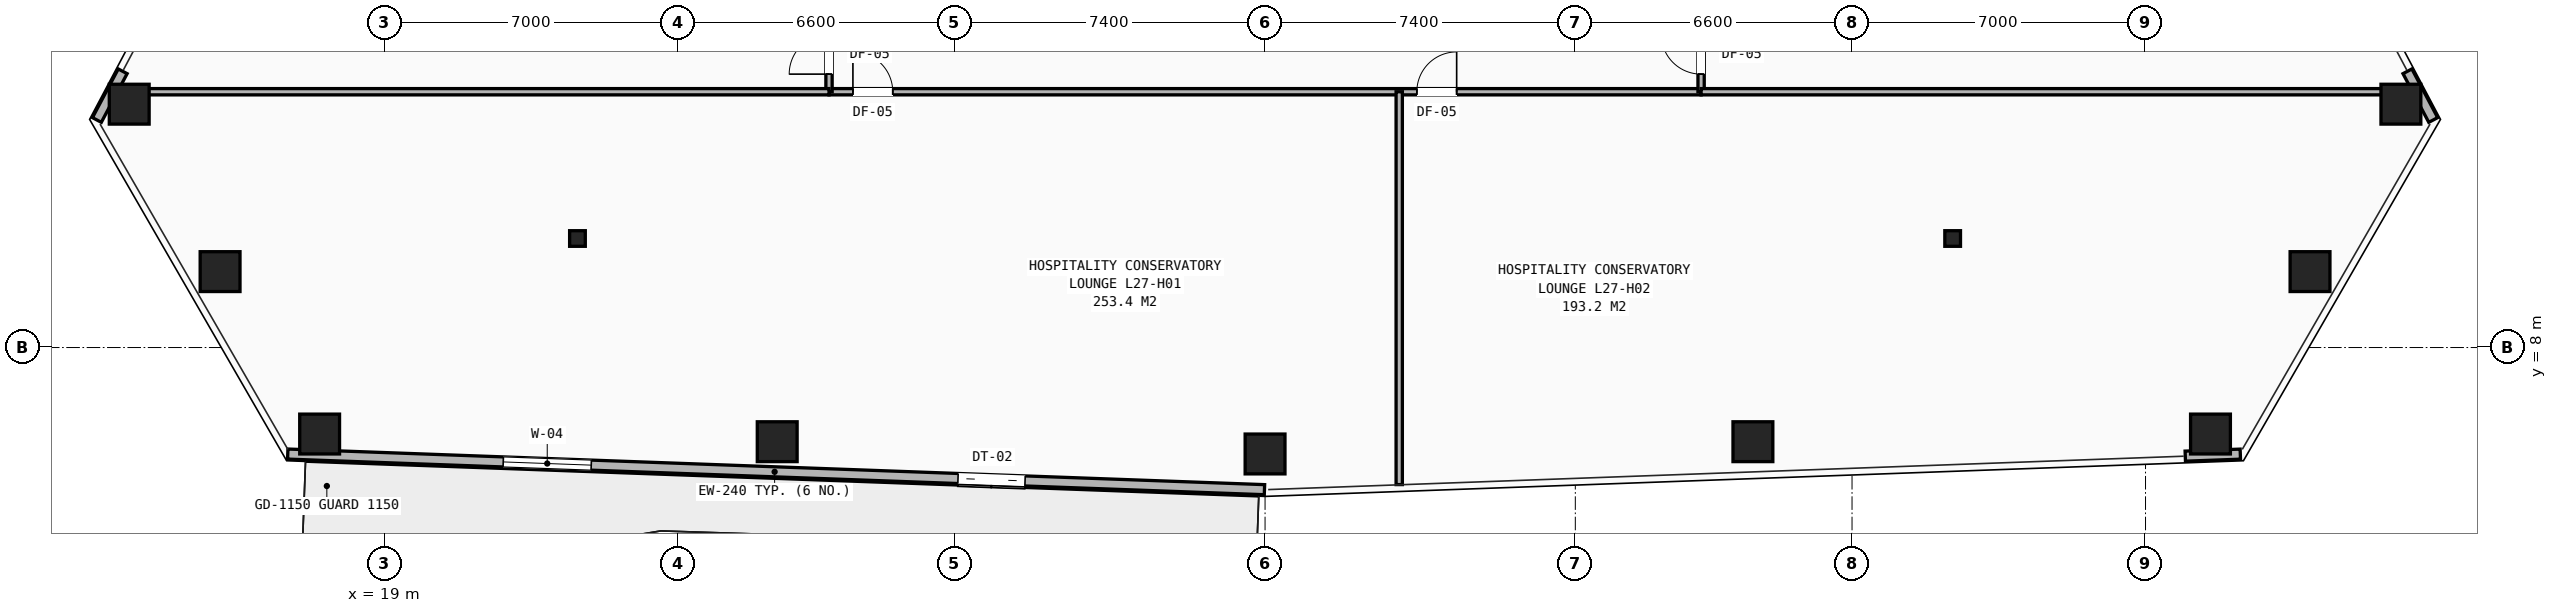
"""IFC4 building model, lengths in metres.
Left out: names, types, materials, properties, quantities, classifications, styles, units other than length and angle.
Written with IfcOpenShell. Run it as: python <this file> out.ifc"""

import sys

from ifc_helpers import new_model, si_unit, direction, frame, frame_2d, origin, origin_2d, place, context, subcontext, project, spatial, rectangle, hollow_rectangle, i_section, extrude, element, fill, save


model = new_model("IFC4")
c1 = context("Model", 3, precision=1e-05, world=origin(), true_north=direction((0.0, 1.0)))
c2 = subcontext(c1, "Body", "Model", "MODEL_VIEW")
j1 = project(units=[si_unit("LENGTHUNIT", "METRE"), si_unit("PLANEANGLEUNIT", "RADIAN")], contexts=[c1])
p1 = place(None, origin())
s1 = spatial("IfcSite", under=j1, at=p1, CompositionType="ELEMENT")
p2 = place(p1, origin())
s2 = spatial("IfcBuilding", under=s1, at=p2, CompositionType="ELEMENT")
p3 = place(p2, frame((0.0, 0.0, 95.8)))
s3 = spatial("IfcBuildingStorey", under=s2, at=p3, CompositionType="ELEMENT", Elevation=95.8)
for number, where, z_axis, x_axis in (
    (1, (23.6, 10.6, 0.0), (0.0, 0.0, 1.0), (1.0, 0.0, 0.0)),
    (2, (56.4, 10.6, 0.0), (0.0, 0.0, 1.0), (1.0, 0.0, 0.0)),
):
    element("IfcColumn", number, at=place(p3, frame(where, z_axis=z_axis, x_axis=x_axis)), inside=s3, PredefinedType="COLUMN", context=c2, shape_type="SweptSolid", body=[
        extrude(i_section(OverallWidth=0.374, OverallDepth=0.372, WebThickness=0.016, FlangeThickness=0.026, at=origin_2d()), origin(), (0.0, 0.0, 1.0), 3.2),
    ])
for number, where, z_axis, x_axis in (
    (3, (12.909, 13.803, 0.0), (0.0, 0.0, 1.0), (1.0, 0.0, 0.0)),
    (4, (15.076, 9.81, 0.0), (0.0, 0.0, 1.0), (1.0, 0.0, 0.0)),
    (5, (17.451, 5.937, 0.0), (0.0, 0.0, 1.0), (1.0, 0.0, 0.0)),
    (6, (28.364, 5.754, 0.0), (0.0, 0.0, 1.0), (1.0, 0.0, 0.0)),
    (7, (40.0, 5.461, 0.0), (0.0, 0.0, 1.0), (1.0, 0.0, 0.0)),
    (8, (51.636, 5.754, 0.0), (0.0, 0.0, 1.0), (1.0, 0.0, 0.0)),
    (9, (62.549, 5.937, 0.0), (0.0, 0.0, 1.0), (1.0, 0.0, 0.0)),
    (10, (64.924, 9.81, 0.0), (0.0, 0.0, 1.0), (1.0, 0.0, 0.0)),
    (11, (67.091, 13.803, 0.0), (0.0, 0.0, 1.0), (1.0, 0.0, 0.0)),
):
    element("IfcColumn", number, at=place(p3, frame(where, z_axis=z_axis, x_axis=x_axis)), inside=s3, PredefinedType="COLUMN", context=c2, shape_type="SweptSolid", body=[
        extrude(hollow_rectangle(XDim=0.95, YDim=0.95, WallThickness=0.065, at=origin_2d()), origin(), (0.0, 0.0, 1.0), 3.2),
    ])
p4 = place(p3, frame((12.753, 14.587, 0.0), z_axis=(0.0, 0.0, 1.0), x_axis=(-0.468058524958, -0.883697469281, 0.0)))
e12 = element("IfcWall", 12, at=p4, inside=s3, PredefinedType="SHEAR", context=c2, shape_type="SweptSolid", body=[
    extrude(rectangle(XDim=1.313, YDim=0.24, at=frame_2d((0.657, 0.0))), origin(), (0.0, 0.0, 1.0), 2.253),
])
p5 = place(p3, frame((39.986, 4.61, 0.0), z_axis=(0.0, 0.0, 1.0), x_axis=(-0.999336382455, 0.036425193232, 0.0)))
e13 = element("IfcWall", 13, at=p5, inside=s3, PredefinedType="SHEAR", context=c2, shape_type="SweptSolid", body=[
    extrude(rectangle(XDim=23.311, YDim=0.24, at=frame_2d((11.656, 0.0))), origin(), (0.0, 0.0, 1.0), 2.253),
])
p6 = place(p5, frame((5.714, 0.0, 0.0)))
e14 = element("IfcOpeningElement", 14, at=p6, cuts=e13, PredefinedType="OPENING", context=c2, shape_type="SweptSolid", body=[
    extrude(rectangle(XDim=1.6, YDim=2.04, at=frame_2d((0.8, 1.02))), frame((0.0, 0.13, 0.0), z_axis=(0.0, -1.0, 0.0), x_axis=(1.0, 0.0, 0.0)), (0.0, 0.0, 1.0), 0.26),
])
p7 = place(p5, frame((16.068, 0.0, 0.25)))
e15 = element("IfcOpeningElement", 15, at=p7, cuts=e13, PredefinedType="OPENING", context=c2, shape_type="SweptSolid", body=[
    extrude(rectangle(XDim=2.1, YDim=1.7, at=frame_2d((1.05, 0.85))), frame((0.0, 0.13, 0.0), z_axis=(0.0, -1.0, 0.0), x_axis=(1.0, 0.0, 0.0)), (0.0, 0.0, 1.0), 0.26),
])
for number, where, z_axis, x_axis in (
    (16, (61.948, 5.41, 0.0), (0.0, 0.0, 1.0), (0.999, 0.036, 0.0)),
    (17, (67.862, 13.427, 0.0), (0.0, 0.0, 1.0), (-0.468, 0.884, 0.0)),
):
    element("IfcWall", number, at=place(p3, frame(where, z_axis=z_axis, x_axis=x_axis)), inside=s3, PredefinedType="SHEAR", context=c2, shape_type="SweptSolid", body=[
        extrude(rectangle(XDim=1.313, YDim=0.24, at=frame_2d((0.657, 0.0))), origin(), (0.0, 0.0, 1.0), 2.253),
    ])
p8 = place(p3, frame((29.6, 14.1, 0.0), z_axis=(0.0, 0.0, 1.0), x_axis=(1.0, 0.0, 0.0)))
e18 = element("IfcWall", 18, at=p8, inside=s3, PredefinedType="PARTITIONING", context=c2, shape_type="SweptSolid", body=[
    extrude(rectangle(XDim=20.8, YDim=0.15, at=frame_2d((10.4, 0.0))), origin(), (0.0, 0.0, 1.0), 2.421),
])
p9 = place(p8, frame((0.57, 0.0, 0.0)))
e19 = element("IfcOpeningElement", 19, at=p9, cuts=e18, PredefinedType="OPENING", context=c2, shape_type="SweptSolid", body=[
    extrude(rectangle(XDim=0.95, YDim=2.1, at=frame_2d((0.475, 1.05))), frame((0.0, 0.085, 0.0), z_axis=(0.0, -1.0, 0.0), x_axis=(1.0, 0.0, 0.0)), (0.0, 0.0, 1.0), 0.17),
])
p10 = place(p8, frame((14.02, 0.0, 0.0)))
e20 = element("IfcOpeningElement", 20, at=p10, cuts=e18, PredefinedType="OPENING", context=c2, shape_type="SweptSolid", body=[
    extrude(rectangle(XDim=0.95, YDim=2.1, at=frame_2d((0.475, 1.05))), frame((0.0, 0.085, 0.0), z_axis=(0.0, -1.0, 0.0), x_axis=(1.0, 0.0, 0.0)), (0.0, 0.0, 1.0), 0.17),
])
p11 = place(p3, frame((29.6, 14.1, 0.0), z_axis=(0.0, 0.0, 1.0), x_axis=(0.0, 1.0, 0.0)))
e21 = element("IfcWall", 21, at=p11, inside=s3, PredefinedType="PARTITIONING", context=c2, shape_type="SweptSolid", body=[
    extrude(rectangle(XDim=21.9, YDim=0.15, at=frame_2d((10.95, 0.0))), origin(), (0.0, 0.0, 1.0), 2.421),
])
p12 = place(p11, frame((0.42, 0.0, 0.0)))
e22 = element("IfcOpeningElement", 22, at=p12, cuts=e21, PredefinedType="OPENING", context=c2, shape_type="SweptSolid", body=[
    extrude(rectangle(XDim=0.95, YDim=2.1, at=frame_2d((0.475, 1.05))), frame((0.0, 0.085, 0.0), z_axis=(0.0, -1.0, 0.0), x_axis=(1.0, 0.0, 0.0)), (0.0, 0.0, 1.0), 0.17),
])
p13 = place(p11, frame((6.12, 0.0, 0.0)))
e23 = element("IfcOpeningElement", 23, at=p13, cuts=e21, PredefinedType="OPENING", context=c2, shape_type="SweptSolid", body=[
    extrude(rectangle(XDim=0.95, YDim=2.1, at=frame_2d((0.475, 1.05))), frame((0.0, 0.085, 0.0), z_axis=(0.0, -1.0, 0.0), x_axis=(1.0, 0.0, 0.0)), (0.0, 0.0, 1.0), 0.17),
])
p14 = place(p11, frame((14.12, 0.0, 0.0)))
e24 = element("IfcOpeningElement", 24, at=p14, cuts=e21, PredefinedType="OPENING", context=c2, shape_type="SweptSolid", body=[
    extrude(rectangle(XDim=0.95, YDim=2.1, at=frame_2d((0.475, 1.05))), frame((0.0, 0.085, 0.0), z_axis=(0.0, -1.0, 0.0), x_axis=(1.0, 0.0, 0.0)), (0.0, 0.0, 1.0), 0.17),
])
p15 = place(p3, frame((50.4, 14.1, 0.0), z_axis=(0.0, 0.0, 1.0), x_axis=(0.0, 1.0, 0.0)))
e25 = element("IfcWall", 25, at=p15, inside=s3, PredefinedType="PARTITIONING", context=c2, shape_type="SweptSolid", body=[
    extrude(rectangle(XDim=21.9, YDim=0.15, at=frame_2d((10.95, 0.0))), origin(), (0.0, 0.0, 1.0), 2.421),
])
p16 = place(p15, frame((0.42, 0.0, 0.0)))
e26 = element("IfcOpeningElement", 26, at=p16, cuts=e25, PredefinedType="OPENING", context=c2, shape_type="SweptSolid", body=[
    extrude(rectangle(XDim=0.95, YDim=2.1, at=frame_2d((0.475, 1.05))), frame((0.0, 0.085, 0.0), z_axis=(0.0, -1.0, 0.0), x_axis=(1.0, 0.0, 0.0)), (0.0, 0.0, 1.0), 0.17),
])
p17 = place(p15, frame((10.82, 0.0, 0.0)))
e27 = element("IfcOpeningElement", 27, at=p17, cuts=e25, PredefinedType="OPENING", context=c2, shape_type="SweptSolid", body=[
    extrude(rectangle(XDim=0.95, YDim=2.1, at=frame_2d((0.475, 1.05))), frame((0.0, 0.085, 0.0), z_axis=(0.0, -1.0, 0.0), x_axis=(1.0, 0.0, 0.0)), (0.0, 0.0, 1.0), 0.17),
])
p18 = place(p3, frame((43.2, 4.731, 0.0), z_axis=(0.0, 0.0, 1.0), x_axis=(0.0, 1.0, 0.0)))
e28 = element("IfcWall", 28, at=p18, inside=s3, PredefinedType="PARTITIONING", context=c2, shape_type="SweptSolid", body=[
    extrude(rectangle(XDim=9.369, YDim=0.15, at=frame_2d((4.685, 0.0))), origin(), (0.0, 0.0, 1.0), 2.258),
])
for number, where, z_axis, x_axis in (
    (29, (12.5, 14.1, 0.0), (0.0, 0.0, 1.0), (1.0, 0.0, 0.0)),
    (30, (50.4, 14.1, 0.0), (0.0, 0.0, 1.0), (1.0, 0.0, 0.0)),
):
    element("IfcWall", number, at=place(p3, frame(where, z_axis=z_axis, x_axis=x_axis)), inside=s3, PredefinedType="PARTITIONING", context=c2, shape_type="SweptSolid", body=[
        extrude(rectangle(XDim=17.1, YDim=0.15, at=frame_2d((8.55, 0.0))), origin(), (0.0, 0.0, 1.0), 2.258),
    ])
p19 = place(p6, origin())
e31 = element("IfcDoor", 31, at=p19, inside=s3, OperationType="SINGLE_SWING_LEFT", PredefinedType="DOOR", context=c2, shape_type="SweptSolid", body=[
    extrude(rectangle(XDim=1.6, YDim=2.04, at=frame_2d((0.8, 1.02))), frame((0.0, 0.025, 0.0), z_axis=(0.0, -1.0, 0.0), x_axis=(1.0, 0.0, 0.0)), (0.0, 0.0, 1.0), 0.05),
])
fill(e14, e31)
p20 = place(p7, origin())
e32 = element("IfcWindow", 32, at=p20, inside=s3, PartitioningType="SINGLE_PANEL", PredefinedType="WINDOW", context=c2, shape_type="SweptSolid", body=[
    extrude(rectangle(XDim=2.1, YDim=1.7, at=frame_2d((1.05, 0.85))), frame((0.0, 0.03, 0.0), z_axis=(0.0, -1.0, 0.0), x_axis=(1.0, 0.0, 0.0)), (0.0, 0.0, 1.0), 0.06),
])
fill(e15, e32)
p21 = place(p9, origin())
e33 = element("IfcDoor", 33, at=p21, inside=s3, OperationType="SINGLE_SWING_LEFT", PredefinedType="DOOR", context=c2, shape_type="SweptSolid", body=[
    extrude(rectangle(XDim=0.95, YDim=2.1, at=frame_2d((0.475, 1.05))), frame((0.0, 0.025, 0.0), z_axis=(0.0, -1.0, 0.0), x_axis=(1.0, 0.0, 0.0)), (0.0, 0.0, 1.0), 0.05),
])
fill(e19, e33)
p22 = place(p10, origin())
e34 = element("IfcDoor", 34, at=p22, inside=s3, OperationType="SINGLE_SWING_RIGHT", PredefinedType="DOOR", context=c2, shape_type="SweptSolid", body=[
    extrude(rectangle(XDim=0.95, YDim=2.1, at=frame_2d((0.475, 1.05))), frame((0.0, 0.025, 0.0), z_axis=(0.0, -1.0, 0.0), x_axis=(1.0, 0.0, 0.0)), (0.0, 0.0, 1.0), 0.05),
])
fill(e20, e34)
p23 = place(p12, origin())
e35 = element("IfcDoor", 35, at=p23, inside=s3, OperationType="SINGLE_SWING_LEFT", PredefinedType="DOOR", context=c2, shape_type="SweptSolid", body=[
    extrude(rectangle(XDim=0.95, YDim=2.1, at=frame_2d((0.475, 1.05))), frame((0.0, 0.025, 0.0), z_axis=(0.0, -1.0, 0.0), x_axis=(1.0, 0.0, 0.0)), (0.0, 0.0, 1.0), 0.05),
])
fill(e22, e35)
p24 = place(p16, origin())
e36 = element("IfcDoor", 36, at=p24, inside=s3, OperationType="SINGLE_SWING_RIGHT", PredefinedType="DOOR", context=c2, shape_type="SweptSolid", body=[
    extrude(rectangle(XDim=0.95, YDim=2.1, at=frame_2d((0.475, 1.05))), frame((0.0, 0.025, 0.0), z_axis=(0.0, -1.0, 0.0), x_axis=(1.0, 0.0, 0.0)), (0.0, 0.0, 1.0), 0.05),
])
fill(e26, e36)
save(model, sys.argv[1])
